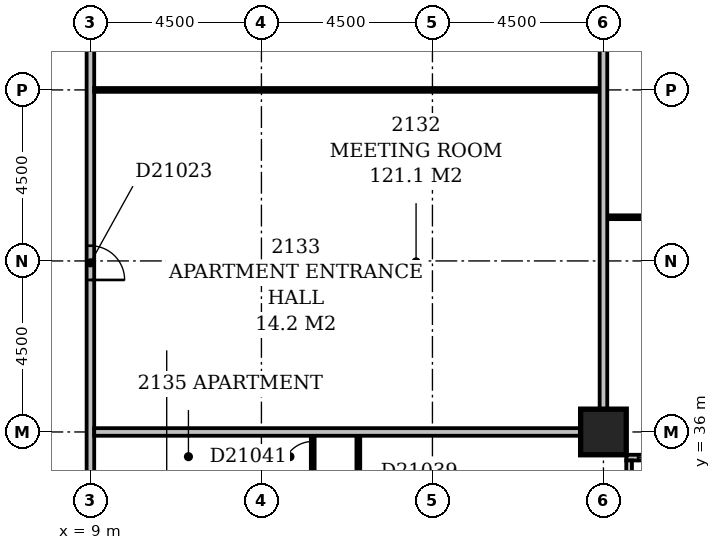
"""IFC4 building model, lengths in metres.
Left out: names, types, materials, properties, quantities, classifications, styles, units other than length and angle.
Written with IfcOpenShell. Run it as: python <this file> out.ifc"""

import sys

from ifc_helpers import new_model, si_unit, direction, frame, frame_2d, origin, origin_2d, place, context, subcontext, project, spatial, rectangle, extrude, element, fill, save


model = new_model("IFC4")
c1 = context("Model", 3, precision=1e-05, world=origin(), true_north=direction((0.0, 1.0)))
c2 = subcontext(c1, "Body", "Model", "MODEL_VIEW")
j1 = project(units=[si_unit("LENGTHUNIT", "METRE"), si_unit("PLANEANGLEUNIT", "RADIAN")], contexts=[c1])
p1 = place(None, origin())
s1 = spatial("IfcSite", under=j1, at=p1, CompositionType="ELEMENT")
p2 = place(p1, origin())
s2 = spatial("IfcBuilding", under=s1, at=p2, CompositionType="ELEMENT")
p3 = place(p2, frame((0.0, 0.0, 86.6)))
s3 = spatial("IfcBuildingStorey", under=s2, at=p3, CompositionType="ELEMENT", Elevation=86.6)
p4 = place(p3, frame((22.5, 36.0, -0.3), z_axis=(0.0, 0.0, 1.0), x_axis=(1.0, 0.0, 0.0)))
e1 = element("IfcColumn", 1, at=p4, inside=s3, PredefinedType="COLUMN", context=c2, shape_type="SweptSolid", body=[
    extrude(rectangle(XDim=1.2, YDim=1.2, at=origin_2d()), origin(), (0.0, 0.0, 1.0), 3.6),
])
p5 = place(p3, frame((23.175, 17.4, 0.0), z_axis=(0.0, 0.0, 1.0), x_axis=(0.0, 1.0, 0.0)))
e2 = element("IfcWall", 2, at=p5, inside=s3, PredefinedType="STANDARD", context=c2, shape_type="SweptSolid", body=[
    extrude(rectangle(XDim=17.85, YDim=0.15, at=frame_2d((8.925, 0.0))), origin(), (0.0, 0.0, 1.0), 2.7),
])
p6 = place(p5, frame((1.435, 0.0, 0.6)))
e3 = element("IfcOpeningElement", 3, at=p6, cuts=e2, PredefinedType="OPENING", context=c2, shape_type="SweptSolid", body=[
    extrude(rectangle(XDim=2.1, YDim=1.8, at=frame_2d((1.05, 0.9))), frame((0.0, 0.087, 0.0), z_axis=(0.0, -1.0, 0.0), x_axis=(1.0, 0.0, 0.0)), (0.0, 0.0, 1.0), 0.174),
])
p7 = place(p5, frame((6.15, 0.0, 0.6)))
e4 = element("IfcOpeningElement", 4, at=p7, cuts=e2, PredefinedType="OPENING", context=c2, shape_type="SweptSolid", body=[
    extrude(rectangle(XDim=2.4, YDim=1.8, at=frame_2d((1.2, 0.9))), frame((0.0, 0.087, 0.0), z_axis=(0.0, -1.0, 0.0), x_axis=(1.0, 0.0, 0.0)), (0.0, 0.0, 1.0), 0.174),
])
p8 = place(p5, frame((10.65, 0.0, 0.6)))
e5 = element("IfcOpeningElement", 5, at=p8, cuts=e2, PredefinedType="OPENING", context=c2, shape_type="SweptSolid", body=[
    extrude(rectangle(XDim=2.4, YDim=1.8, at=frame_2d((1.2, 0.9))), frame((0.0, 0.087, 0.0), z_axis=(0.0, -1.0, 0.0), x_axis=(1.0, 0.0, 0.0)), (0.0, 0.0, 1.0), 0.174),
])
p9 = place(p5, frame((15.15, 0.0, 0.6)))
e6 = element("IfcOpeningElement", 6, at=p9, cuts=e2, PredefinedType="OPENING", context=c2, shape_type="SweptSolid", body=[
    extrude(rectangle(XDim=2.4, YDim=1.8, at=frame_2d((1.2, 0.9))), frame((0.0, 0.087, 0.0), z_axis=(0.0, -1.0, 0.0), x_axis=(1.0, 0.0, 0.0)), (0.0, 0.0, 1.0), 0.174),
])
p10 = place(p3, frame((23.1, 35.325, 0.0), z_axis=(0.0, 0.0, 1.0), x_axis=(1.0, 0.0, 0.0)))
e7 = element("IfcWall", 7, at=p10, inside=s3, PredefinedType="STANDARD", context=c2, shape_type="SweptSolid", body=[
    extrude(rectangle(XDim=45.15, YDim=0.15, at=frame_2d((22.575, 0.0))), origin(), (0.0, 0.0, 1.0), 2.7),
])
p11 = place(p10, frame((0.312, 0.0, 0.6)))
e8 = element("IfcOpeningElement", 8, at=p11, cuts=e7, PredefinedType="OPENING", context=c2, shape_type="SweptSolid", body=[
    extrude(rectangle(XDim=2.1, YDim=1.8, at=frame_2d((1.05, 0.9))), frame((0.0, 0.087, 0.0), z_axis=(0.0, -1.0, 0.0), x_axis=(1.0, 0.0, 0.0)), (0.0, 0.0, 1.0), 0.174),
])
p12 = place(p10, frame((4.95, 0.0, 0.6)))
e9 = element("IfcOpeningElement", 9, at=p12, cuts=e7, PredefinedType="OPENING", context=c2, shape_type="SweptSolid", body=[
    extrude(rectangle(XDim=2.4, YDim=1.8, at=frame_2d((1.2, 0.9))), frame((0.0, 0.087, 0.0), z_axis=(0.0, -1.0, 0.0), x_axis=(1.0, 0.0, 0.0)), (0.0, 0.0, 1.0), 0.174),
])
p13 = place(p10, frame((9.45, 0.0, 0.6)))
e10 = element("IfcOpeningElement", 10, at=p13, cuts=e7, PredefinedType="OPENING", context=c2, shape_type="SweptSolid", body=[
    extrude(rectangle(XDim=2.4, YDim=1.8, at=frame_2d((1.2, 0.9))), frame((0.0, 0.087, 0.0), z_axis=(0.0, -1.0, 0.0), x_axis=(1.0, 0.0, 0.0)), (0.0, 0.0, 1.0), 0.174),
])
p14 = place(p10, frame((13.95, 0.0, 0.6)))
e11 = element("IfcOpeningElement", 11, at=p14, cuts=e7, PredefinedType="OPENING", context=c2, shape_type="SweptSolid", body=[
    extrude(rectangle(XDim=2.4, YDim=1.8, at=frame_2d((1.2, 0.9))), frame((0.0, 0.087, 0.0), z_axis=(0.0, -1.0, 0.0), x_axis=(1.0, 0.0, 0.0)), (0.0, 0.0, 1.0), 0.174),
])
p15 = place(p10, frame((18.45, 0.0, 0.6)))
e12 = element("IfcOpeningElement", 12, at=p15, cuts=e7, PredefinedType="OPENING", context=c2, shape_type="SweptSolid", body=[
    extrude(rectangle(XDim=2.4, YDim=1.8, at=frame_2d((1.2, 0.9))), frame((0.0, 0.087, 0.0), z_axis=(0.0, -1.0, 0.0), x_axis=(1.0, 0.0, 0.0)), (0.0, 0.0, 1.0), 0.174),
])
p16 = place(p10, frame((24.097, 0.0, 0.6)))
e13 = element("IfcOpeningElement", 13, at=p16, cuts=e7, PredefinedType="OPENING", context=c2, shape_type="SweptSolid", body=[
    extrude(rectangle(XDim=1.5, YDim=1.8, at=frame_2d((0.75, 0.9))), frame((0.0, 0.087, 0.0), z_axis=(0.0, -1.0, 0.0), x_axis=(1.0, 0.0, 0.0)), (0.0, 0.0, 1.0), 0.174),
])
p17 = place(p10, frame((27.331, 0.0, 0.6)))
e14 = element("IfcOpeningElement", 14, at=p17, cuts=e7, PredefinedType="OPENING", context=c2, shape_type="SweptSolid", body=[
    extrude(rectangle(XDim=2.1, YDim=1.8, at=frame_2d((1.05, 0.9))), frame((0.0, 0.087, 0.0), z_axis=(0.0, -1.0, 0.0), x_axis=(1.0, 0.0, 0.0)), (0.0, 0.0, 1.0), 0.174),
])
p18 = place(p10, frame((31.95, 0.0, 0.6)))
e15 = element("IfcOpeningElement", 15, at=p18, cuts=e7, PredefinedType="OPENING", context=c2, shape_type="SweptSolid", body=[
    extrude(rectangle(XDim=2.4, YDim=1.8, at=frame_2d((1.2, 0.9))), frame((0.0, 0.087, 0.0), z_axis=(0.0, -1.0, 0.0), x_axis=(1.0, 0.0, 0.0)), (0.0, 0.0, 1.0), 0.174),
])
p19 = place(p10, frame((36.45, 0.0, 0.6)))
e16 = element("IfcOpeningElement", 16, at=p19, cuts=e7, PredefinedType="OPENING", context=c2, shape_type="SweptSolid", body=[
    extrude(rectangle(XDim=2.4, YDim=1.8, at=frame_2d((1.2, 0.9))), frame((0.0, 0.087, 0.0), z_axis=(0.0, -1.0, 0.0), x_axis=(1.0, 0.0, 0.0)), (0.0, 0.0, 1.0), 0.174),
])
p20 = place(p10, frame((40.95, 0.0, 0.6)))
e17 = element("IfcOpeningElement", 17, at=p20, cuts=e7, PredefinedType="OPENING", context=c2, shape_type="SweptSolid", body=[
    extrude(rectangle(XDim=2.4, YDim=1.8, at=frame_2d((1.2, 0.9))), frame((0.0, 0.087, 0.0), z_axis=(0.0, -1.0, 0.0), x_axis=(1.0, 0.0, 0.0)), (0.0, 0.0, 1.0), 0.174),
])
p21 = place(p3, frame((9.0, 5.0, 0.0), z_axis=(0.0, 0.0, 1.0), x_axis=(0.0, 1.0, 0.0)))
e18 = element("IfcWall", 18, at=p21, inside=s3, PredefinedType="PARTITIONING", context=c2, shape_type="SweptSolid", body=[
    extrude(rectangle(XDim=44.5, YDim=0.2, at=frame_2d((22.25, 0.0))), origin(), (0.0, 0.0, 1.0), 3.3),
])
p22 = place(p21, frame((28.45, 0.0, 0.0)))
e19 = element("IfcOpeningElement", 19, at=p22, cuts=e18, PredefinedType="OPENING", context=c2, shape_type="SweptSolid", body=[
    extrude(rectangle(XDim=1.0, YDim=2.1, at=frame_2d((0.5, 1.05))), frame((0.0, 0.112, 0.0), z_axis=(0.0, -1.0, 0.0), x_axis=(1.0, 0.0, 0.0)), (0.0, 0.0, 1.0), 0.224),
])
p23 = place(p21, frame((22.8, 0.0, 0.0)))
e20 = element("IfcOpeningElement", 20, at=p23, cuts=e18, PredefinedType="OPENING", context=c2, shape_type="SweptSolid", body=[
    extrude(rectangle(XDim=1.0, YDim=2.1, at=frame_2d((0.5, 1.05))), frame((0.0, 0.112, 0.0), z_axis=(0.0, -1.0, 0.0), x_axis=(1.0, 0.0, 0.0)), (0.0, 0.0, 1.0), 0.224),
])
p24 = place(p21, frame((14.55, 0.0, 0.0)))
e21 = element("IfcOpeningElement", 21, at=p24, cuts=e18, PredefinedType="OPENING", context=c2, shape_type="SweptSolid", body=[
    extrude(rectangle(XDim=1.0, YDim=2.1, at=frame_2d((0.5, 1.05))), frame((0.0, 0.112, 0.0), z_axis=(0.0, -1.0, 0.0), x_axis=(1.0, 0.0, 0.0)), (0.0, 0.0, 1.0), 0.224),
])
p25 = place(p21, frame((9.3, 0.0, 0.0)))
e22 = element("IfcOpeningElement", 22, at=p25, cuts=e18, PredefinedType="OPENING", context=c2, shape_type="SweptSolid", body=[
    extrude(rectangle(XDim=1.0, YDim=2.1, at=frame_2d((0.5, 1.05))), frame((0.0, 0.112, 0.0), z_axis=(0.0, -1.0, 0.0), x_axis=(1.0, 0.0, 0.0)), (0.0, 0.0, 1.0), 0.224),
])
p26 = place(p21, frame((35.0, 0.0, 0.0)))
e23 = element("IfcOpeningElement", 23, at=p26, cuts=e18, PredefinedType="OPENING", context=c2, shape_type="SweptSolid", body=[
    extrude(rectangle(XDim=0.9, YDim=2.1, at=frame_2d((0.45, 1.05))), frame((0.0, 0.112, 0.0), z_axis=(0.0, -1.0, 0.0), x_axis=(1.0, 0.0, 0.0)), (0.0, 0.0, 1.0), 0.224),
])
p27 = place(p21, frame((1.5, 0.0, 0.0)))
e24 = element("IfcOpeningElement", 24, at=p27, cuts=e18, PredefinedType="OPENING", context=c2, shape_type="SweptSolid", body=[
    extrude(rectangle(XDim=0.9, YDim=2.1, at=frame_2d((0.45, 1.05))), frame((0.0, 0.112, 0.0), z_axis=(0.0, -1.0, 0.0), x_axis=(1.0, 0.0, 0.0)), (0.0, 0.0, 1.0), 0.224),
])
p28 = place(p3, frame((16.05, 31.6, 0.0), z_axis=(0.0, 0.0, 1.0), x_axis=(0.0, 1.0, 0.0)))
e25 = element("IfcWall", 25, at=p28, inside=s3, PredefinedType="PARTITIONING", context=c2, shape_type="SweptSolid", body=[
    extrude(rectangle(XDim=4.3, YDim=0.1, at=frame_2d((2.15, 0.0))), origin(), (0.0, 0.0, 1.0), 3.3),
])
p29 = place(p28, frame((1.7, 0.0, 0.0)))
e26 = element("IfcOpeningElement", 26, at=p29, cuts=e25, PredefinedType="OPENING", context=c2, shape_type="SweptSolid", body=[
    extrude(rectangle(XDim=0.9, YDim=2.1, at=frame_2d((0.45, 1.05))), frame((0.0, 0.062, 0.0), z_axis=(0.0, -1.0, 0.0), x_axis=(1.0, 0.0, 0.0)), (0.0, 0.0, 1.0), 0.124),
])
p30 = place(p3, frame((14.85, 34.7, 0.0), z_axis=(0.0, 0.0, 1.0), x_axis=(0.0, 1.0, 0.0)))
e27 = element("IfcWall", 27, at=p30, inside=s3, PredefinedType="PARTITIONING", context=c2, shape_type="SweptSolid", body=[
    extrude(rectangle(XDim=1.2, YDim=0.1, at=frame_2d((0.6, 0.0))), origin(), (0.0, 0.0, 1.0), 3.3),
])
p31 = place(p30, frame((0.25, 0.0, 0.0)))
e28 = element("IfcOpeningElement", 28, at=p31, cuts=e27, PredefinedType="OPENING", context=c2, shape_type="SweptSolid", body=[
    extrude(rectangle(XDim=0.8, YDim=2.1, at=frame_2d((0.4, 1.05))), frame((0.0, 0.062, 0.0), z_axis=(0.0, -1.0, 0.0), x_axis=(1.0, 0.0, 0.0)), (0.0, 0.0, 1.0), 0.124),
])
p32 = place(p3, frame((9.1, 36.0, 0.0), z_axis=(0.0, 0.0, 1.0), x_axis=(1.0, 0.0, 0.0)))
e29 = element("IfcWall", 29, at=p32, inside=s3, PredefinedType="PARTITIONING", context=c2, shape_type="SweptSolid", body=[
    extrude(rectangle(XDim=12.8, YDim=0.2, at=frame_2d((6.4, 0.0))), origin(), (0.0, 0.0, 1.0), 2.4),
])
p33 = place(p3, frame((22.5, 36.6, 0.0), z_axis=(0.0, 0.0, 1.0), x_axis=(0.0, 1.0, 0.0)))
e30 = element("IfcWall", 30, at=p33, inside=s3, PredefinedType="PARTITIONING", context=c2, shape_type="SweptSolid", body=[
    extrude(rectangle(XDim=12.8, YDim=0.2, at=frame_2d((6.4, 0.0))), origin(), (0.0, 0.0, 1.0), 3.3),
])
p34 = place(p3, frame((22.6, 41.65, 0.0), z_axis=(0.0, 0.0, 1.0), x_axis=(1.0, 0.0, 0.0)))
e31 = element("IfcWall", 31, at=p34, inside=s3, PredefinedType="PARTITIONING", context=c2, shape_type="SweptSolid", body=[
    extrude(rectangle(XDim=8.8, YDim=0.1, at=frame_2d((4.4, 0.0))), origin(), (0.0, 0.0, 1.0), 3.3),
])
p35 = place(p34, frame((1.7, 0.0, 0.0)))
e32 = element("IfcOpeningElement", 32, at=p35, cuts=e31, PredefinedType="OPENING", context=c2, shape_type="SweptSolid", body=[
    extrude(rectangle(XDim=0.9, YDim=2.1, at=frame_2d((0.45, 1.05))), frame((0.0, 0.062, 0.0), z_axis=(0.0, -1.0, 0.0), x_axis=(1.0, 0.0, 0.0)), (0.0, 0.0, 1.0), 0.124),
])
p36 = place(p34, frame((6.2, 0.0, 0.0)))
e33 = element("IfcOpeningElement", 33, at=p36, cuts=e31, PredefinedType="OPENING", context=c2, shape_type="SweptSolid", body=[
    extrude(rectangle(XDim=0.9, YDim=2.1, at=frame_2d((0.45, 1.05))), frame((0.0, 0.062, 0.0), z_axis=(0.0, -1.0, 0.0), x_axis=(1.0, 0.0, 0.0)), (0.0, 0.0, 1.0), 0.124),
])
p37 = place(p3, frame((9.1, 45.0, 0.0), z_axis=(0.0, 0.0, 1.0), x_axis=(1.0, 0.0, 0.0)))
e34 = element("IfcWall", 34, at=p37, inside=s3, PredefinedType="PARTITIONING", context=c2, shape_type="SweptSolid", body=[
    extrude(rectangle(XDim=13.3, YDim=0.1, at=frame_2d((6.65, 0.0))), origin(), (0.0, 0.0, 1.0), 3.3),
])
p38 = place(p11, origin())
e35 = element("IfcWindow", 35, at=p38, inside=s3, PartitioningType="SINGLE_PANEL", PredefinedType="WINDOW", context=c2, shape_type="SweptSolid", body=[
    extrude(rectangle(XDim=2.1, YDim=1.8, at=frame_2d((1.05, 0.9))), frame((0.0, 0.03, 0.0), z_axis=(0.0, -1.0, 0.0), x_axis=(1.0, 0.0, 0.0)), (0.0, 0.0, 1.0), 0.06),
])
fill(e8, e35)
p39 = place(p26, frame((0.9, 0.0, 0.0), z_axis=(0.0, 0.0, 1.0), x_axis=(-1.0, 0.0, 0.0)))
e36 = element("IfcDoor", 36, at=p39, inside=s3, OperationType="SINGLE_SWING_RIGHT", PredefinedType="DOOR", context=c2, shape_type="SweptSolid", body=[
    extrude(rectangle(XDim=0.9, YDim=2.1, at=frame_2d((0.45, 1.05))), frame((0.0, 0.025, 0.0), z_axis=(0.0, -1.0, 0.0), x_axis=(1.0, 0.0, 0.0)), (0.0, 0.0, 1.0), 0.05),
])
fill(e23, e36)
p40 = place(p31, origin())
e37 = element("IfcDoor", 37, at=p40, inside=s3, OperationType="SINGLE_SWING_LEFT", PredefinedType="DOOR", context=c2, shape_type="SweptSolid", body=[
    extrude(rectangle(XDim=0.8, YDim=2.1, at=frame_2d((0.4, 1.05))), frame((0.0, 0.025, 0.0), z_axis=(0.0, -1.0, 0.0), x_axis=(1.0, 0.0, 0.0)), (0.0, 0.0, 1.0), 0.05),
])
fill(e28, e37)
save(model, sys.argv[1])
